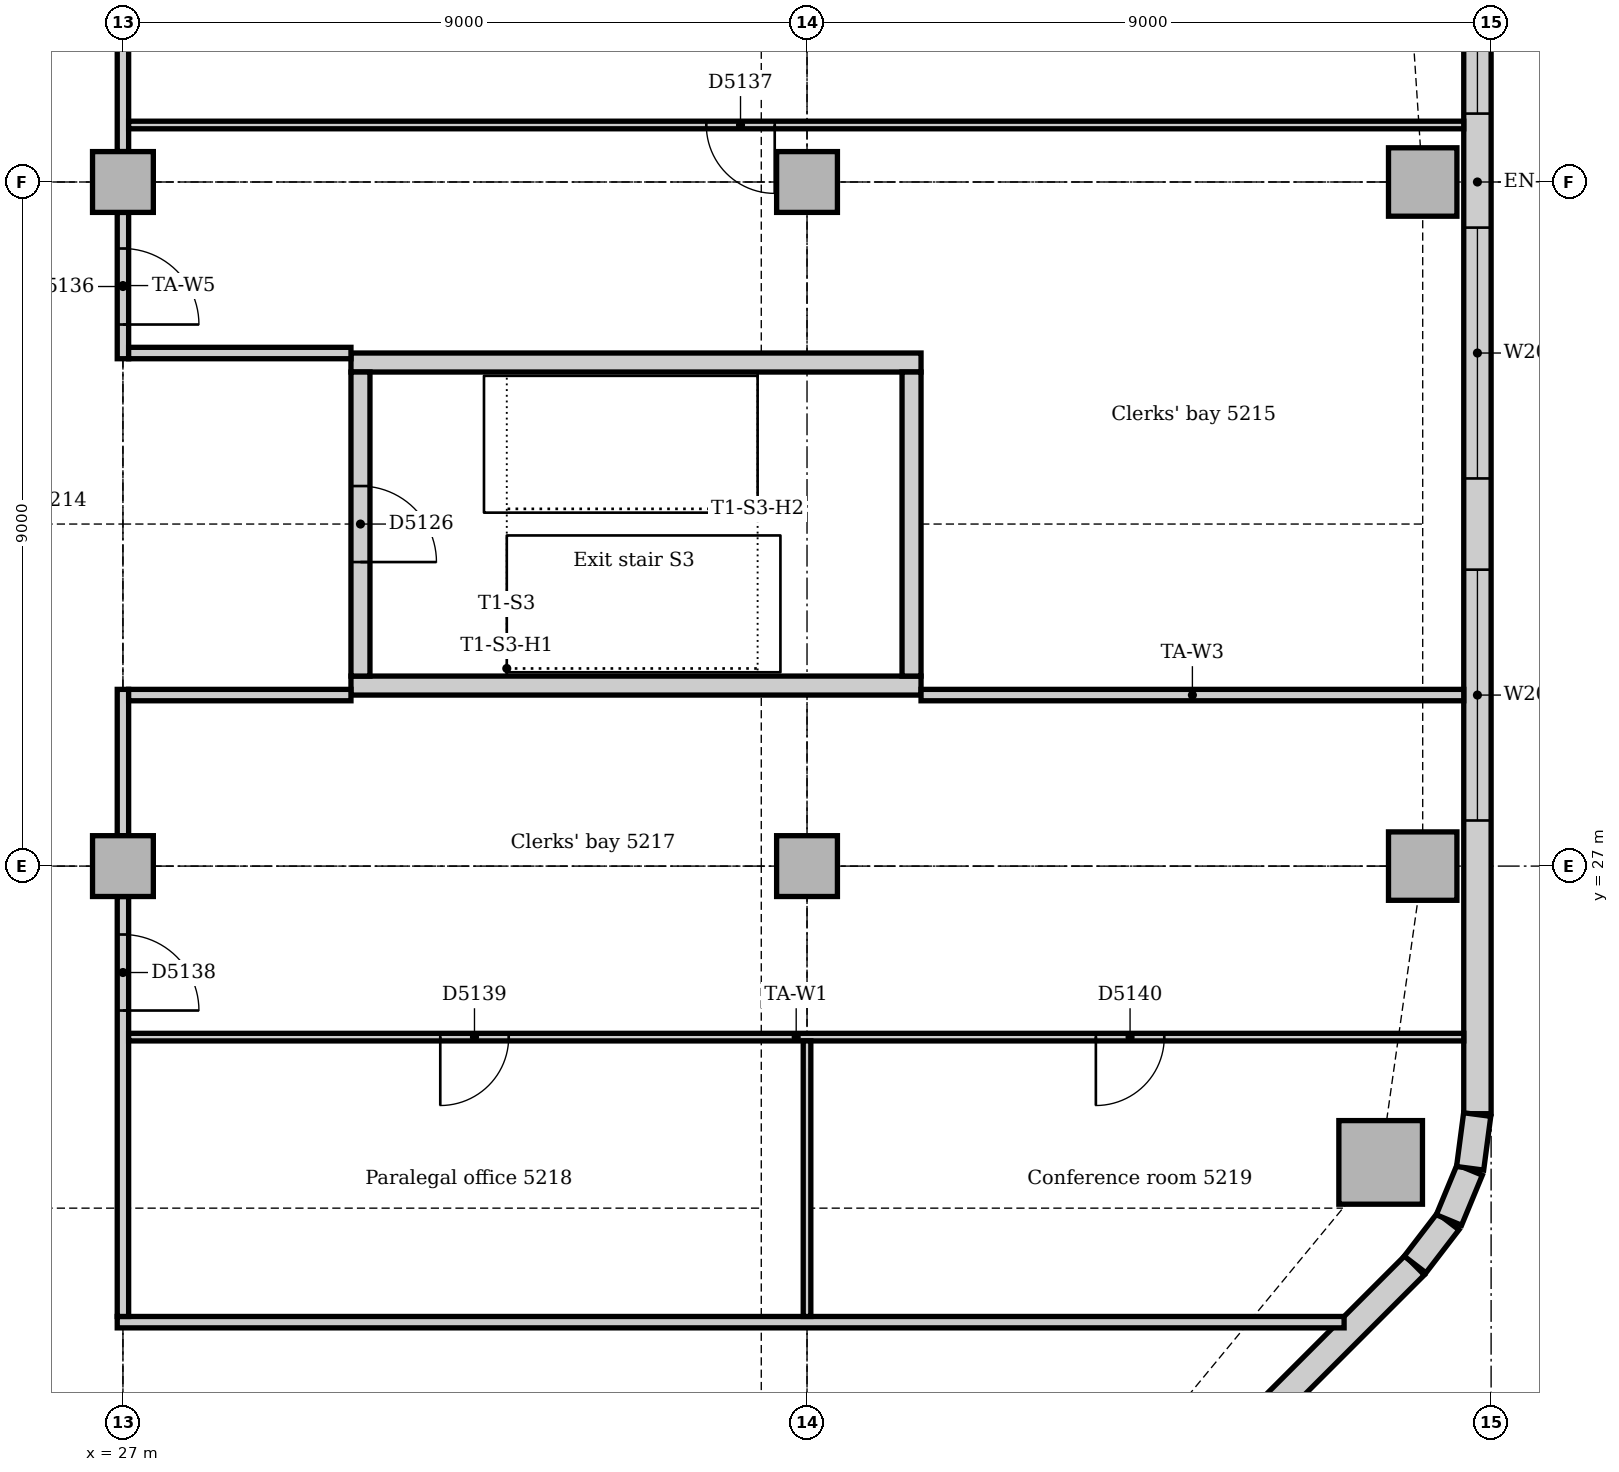
"""IFC4 building model, lengths in metres.
Left out: names, types, materials, properties, quantities, classifications, styles, units other than length and angle.
Written with IfcOpenShell. Run it as: python <this file> out.ifc"""

import sys

from ifc_helpers import new_model, si_unit, direction, frame, frame_2d, origin, origin_2d, place, context, subcontext, project, spatial, rectangle, extrude, element, fill, save


model = new_model("IFC4")
c1 = context("Model", 3, precision=1e-05, world=origin(), true_north=direction((0.0, 1.0)))
c2 = subcontext(c1, "Body", "Model", "MODEL_VIEW")
j1 = project(units=[si_unit("LENGTHUNIT", "METRE"), si_unit("PLANEANGLEUNIT", "RADIAN")], contexts=[c1])
p1 = place(None, origin())
s1 = spatial("IfcSite", under=j1, at=p1, CompositionType="ELEMENT")
p2 = place(p1, origin())
s2 = spatial("IfcBuilding", under=s1, at=p2, CompositionType="ELEMENT")
p3 = place(p2, frame((0.0, 0.0, 218.0)))
s3 = spatial("IfcBuildingStorey", under=s2, at=p3, CompositionType="ELEMENT", Elevation=218.0)
for number, where, z_axis, x_axis in (
    (1, (30.0, 29.375, 0.0), (0.0, 0.0, 1.0), (1.0, 0.0, 0.0)),
    (2, (37.5, 33.625, 0.0), (0.0, 0.0, 1.0), (-1.0, 0.0, 0.0)),
):
    element("IfcWall", number, at=place(p3, frame(where, z_axis=z_axis, x_axis=x_axis)), inside=s3, PredefinedType="SOLIDWALL", context=c2, shape_type="SweptSolid", body=[
        extrude(rectangle(XDim=7.5, YDim=0.25, at=frame_2d((3.75, 0.0))), origin(), (0.0, 0.0, 1.0), 4.0),
    ])
p4 = place(p3, frame((37.375, 29.5, 0.0), z_axis=(0.0, 0.0, 1.0), x_axis=(0.0, 1.0, 0.0)))
e3 = element("IfcWall", 3, at=p4, inside=s3, PredefinedType="SOLIDWALL", context=c2, shape_type="SweptSolid", body=[
    extrude(rectangle(XDim=4.0, YDim=0.25, at=frame_2d((2.0, 0.0))), origin(), (0.0, 0.0, 1.0), 4.0),
])
p5 = place(p3, frame((30.125, 33.5, 0.0), z_axis=(0.0, 0.0, 1.0), x_axis=(0.0, -1.0, 0.0)))
e4 = element("IfcWall", 4, at=p5, inside=s3, PredefinedType="SOLIDWALL", context=c2, shape_type="SweptSolid", body=[
    extrude(rectangle(XDim=4.0, YDim=0.25, at=frame_2d((2.0, 0.0))), origin(), (0.0, 0.0, 1.0), 4.0),
])
p6 = place(p5, frame((1.5, 0.0, 0.0)))
e5 = element("IfcOpeningElement", 5, at=p6, cuts=e4, PredefinedType="OPENING", context=c2, shape_type="SweptSolid", body=[
    extrude(rectangle(XDim=1.0, YDim=2.1, at=frame_2d((0.5, 1.05))), frame((0.0, 0.135, 0.0), z_axis=(0.0, -1.0, 0.0), x_axis=(1.0, 0.0, 0.0)), (0.0, 0.0, 1.0), 0.27),
])
p7 = place(p3, frame((43.547, 23.102, 0.0), z_axis=(0.0, 0.0, 1.0), x_axis=(1.0, 0.0, 0.0)))
e6 = element("IfcColumn", 6, at=p7, inside=s3, PredefinedType="COLUMN", context=c2, shape_type="SweptSolid", body=[
    extrude(rectangle(XDim=1.1, YDim=1.1, at=origin_2d()), origin(), (0.0, 0.0, 1.0), 3.85),
])
for number, where, z_axis, x_axis in (
    (7, (44.1, 27.0, 0.0), (0.0, 0.0, 1.0), (1.0, 0.0, 0.0)),
    (8, (44.1, 36.0, 0.0), (0.0, 0.0, 1.0), (1.0, 0.0, 0.0)),
):
    element("IfcColumn", number, at=place(p3, frame(where, z_axis=z_axis, x_axis=x_axis)), inside=s3, PredefinedType="COLUMN", context=c2, shape_type="SweptSolid", body=[
        extrude(rectangle(XDim=0.9, YDim=0.9, at=origin_2d()), origin(), (0.0, 0.0, 1.0), 3.85),
    ])
for number, where, z_axis, x_axis in (
    (9, (27.0, 27.0, 0.0), (0.0, 0.0, 1.0), (1.0, 0.0, 0.0)),
    (10, (27.0, 36.0, 0.0), (0.0, 0.0, 1.0), (1.0, 0.0, 0.0)),
    (11, (36.0, 27.0, 0.0), (0.0, 0.0, 1.0), (1.0, 0.0, 0.0)),
    (12, (36.0, 36.0, 0.0), (0.0, 0.0, 1.0), (1.0, 0.0, 0.0)),
):
    element("IfcColumn", number, at=place(p3, frame(where, z_axis=z_axis, x_axis=x_axis)), inside=s3, PredefinedType="COLUMN", context=c2, shape_type="SweptSolid", body=[
        extrude(rectangle(XDim=0.8, YDim=0.8, at=origin_2d()), origin(), (0.0, 0.0, 1.0), 3.85),
    ])
p8 = place(p3, frame((36.751, 14.506, 0.0), z_axis=(0.0, 0.0, 1.0), x_axis=(0.707106781187, 0.707106781187, 0.0)))
e13 = element("IfcWall", 13, at=p8, inside=s3, PredefinedType="STANDARD", context=c2, shape_type="SweptSolid", body=[
    extrude(rectangle(XDim=10.243, YDim=0.36, at=frame_2d((5.121, 0.0))), origin(), (0.0, 0.0, 1.0), 3.85),
])
p9 = place(p8, frame((5.021, 0.0, 0.9)))
e14 = element("IfcOpeningElement", 14, at=p9, cuts=e13, PredefinedType="OPENING", context=c2, shape_type="SweptSolid", body=[
    extrude(rectangle(XDim=1.8, YDim=1.6, at=frame_2d((0.9, 0.8))), frame((0.0, 0.19, 0.0), z_axis=(0.0, -1.0, 0.0), x_axis=(1.0, 0.0, 0.0)), (0.0, 0.0, 1.0), 0.38),
])
p10 = place(p3, frame((44.82, 23.743, 0.0), z_axis=(0.0, 0.0, 1.0), x_axis=(0.0, 1.0, 0.0)))
e15 = element("IfcWall", 15, at=p10, inside=s3, PredefinedType="STANDARD", context=c2, shape_type="SweptSolid", body=[
    extrude(rectangle(XDim=24.515, YDim=0.36, at=frame_2d((12.257, 0.0))), origin(), (0.0, 0.0, 1.0), 3.85),
])
p11 = place(p10, frame((3.857, 0.0, 0.9)))
e16 = element("IfcOpeningElement", 16, at=p11, cuts=e15, PredefinedType="OPENING", context=c2, shape_type="SweptSolid", body=[
    extrude(rectangle(XDim=3.3, YDim=1.6, at=frame_2d((1.65, 0.8))), frame((0.0, 0.19, 0.0), z_axis=(0.0, -1.0, 0.0), x_axis=(1.0, 0.0, 0.0)), (0.0, 0.0, 1.0), 0.38),
])
p12 = place(p10, frame((8.357, 0.0, 0.9)))
e17 = element("IfcOpeningElement", 17, at=p12, cuts=e15, PredefinedType="OPENING", context=c2, shape_type="SweptSolid", body=[
    extrude(rectangle(XDim=3.3, YDim=1.6, at=frame_2d((1.65, 0.8))), frame((0.0, 0.19, 0.0), z_axis=(0.0, -1.0, 0.0), x_axis=(1.0, 0.0, 0.0)), (0.0, 0.0, 1.0), 0.38),
])
p13 = place(p10, frame((13.157, 0.0, 0.9)))
e18 = element("IfcOpeningElement", 18, at=p13, cuts=e15, PredefinedType="OPENING", context=c2, shape_type="SweptSolid", body=[
    extrude(rectangle(XDim=3.3, YDim=1.6, at=frame_2d((1.65, 0.8))), frame((0.0, 0.19, 0.0), z_axis=(0.0, -1.0, 0.0), x_axis=(1.0, 0.0, 0.0)), (0.0, 0.0, 1.0), 0.38),
])
p14 = place(p10, frame((17.357, 0.0, 0.9)))
e19 = element("IfcOpeningElement", 19, at=p14, cuts=e15, PredefinedType="OPENING", context=c2, shape_type="SweptSolid", body=[
    extrude(rectangle(XDim=3.3, YDim=1.6, at=frame_2d((1.65, 0.8))), frame((0.0, 0.19, 0.0), z_axis=(0.0, -1.0, 0.0), x_axis=(1.0, 0.0, 0.0)), (0.0, 0.0, 1.0), 0.38),
])
p15 = place(p3, frame((44.0, 21.759, 0.0), z_axis=(0.0, 0.0, 1.0), x_axis=(0.608802368033, 0.793321924995, 0.0)))
e20 = element("IfcWall", 20, at=p15, inside=s3, PredefinedType="STANDARD", context=c2, shape_type="SweptSolid", body=[
    extrude(rectangle(XDim=0.713, YDim=0.36, at=frame_2d((0.357, 0.0))), origin(), (0.0, 0.0, 1.0), 3.85),
])
for number, where, z_axis, x_axis in (
    (21, (44.445, 22.344, 0.0), (0.0, 0.0, 1.0), (0.383, 0.924, 0.0)),
    (22, (44.724, 23.024, 0.0), (0.0, 0.0, 1.0), (0.131, 0.991, 0.0)),
):
    element("IfcWall", number, at=place(p3, frame(where, z_axis=z_axis, x_axis=x_axis)), inside=s3, PredefinedType="STANDARD", context=c2, shape_type="SweptSolid", body=[
        extrude(rectangle(XDim=0.713, YDim=0.36, at=frame_2d((0.356, 0.0))), origin(), (0.0, 0.0, 1.0), 3.85),
    ])
p16 = place(p3, frame((26.925, 21.0, 0.0), z_axis=(0.0, 0.0, 1.0), x_axis=(1.0, 0.0, 0.0)))
e23 = element("IfcWall", 23, at=p16, inside=s3, PredefinedType="PARTITIONING", context=c2, shape_type="SweptSolid", body=[
    extrude(rectangle(XDim=16.141, YDim=0.15, at=frame_2d((8.07, 0.0))), origin(), (0.0, 0.0, 1.0), 3.85),
])
p17 = place(p3, frame((27.0, 33.675, 0.0), z_axis=(0.0, 0.0, 1.0), x_axis=(0.0, 1.0, 0.0)))
e24 = element("IfcWall", 24, at=p17, inside=s3, PredefinedType="PARTITIONING", context=c2, shape_type="SweptSolid", body=[
    extrude(rectangle(XDim=1.925, YDim=0.15, at=frame_2d((0.963, 0.0))), origin(), (0.0, 0.0, 1.0), 3.35),
])
p18 = place(p17, frame((0.45, 0.0, 0.0)))
e25 = element("IfcOpeningElement", 25, at=p18, cuts=e24, PredefinedType="OPENING", context=c2, shape_type="SweptSolid", body=[
    extrude(rectangle(XDim=1.0, YDim=2.1, at=frame_2d((0.5, 1.05))), frame((0.0, 0.085, 0.0), z_axis=(0.0, -1.0, 0.0), x_axis=(1.0, 0.0, 0.0)), (0.0, 0.0, 1.0), 0.17),
])
p19 = place(p3, frame((27.0, 36.4, 0.0), z_axis=(0.0, 0.0, 1.0), x_axis=(0.0, 1.0, 0.0)))
e26 = element("IfcWall", 26, at=p19, inside=s3, PredefinedType="PARTITIONING", context=c2, shape_type="SweptSolid", body=[
    extrude(rectangle(XDim=7.3, YDim=0.15, at=frame_2d((3.65, 0.0))), origin(), (0.0, 0.0, 1.0), 3.35),
])
p20 = place(p3, frame((27.0, 21.075, 0.0), z_axis=(0.0, 0.0, 1.0), x_axis=(0.0, 1.0, 0.0)))
e27 = element("IfcWall", 27, at=p20, inside=s3, PredefinedType="PARTITIONING", context=c2, shape_type="SweptSolid", body=[
    extrude(rectangle(XDim=5.525, YDim=0.15, at=frame_2d((2.763, 0.0))), origin(), (0.0, 0.0, 1.0), 3.35),
])
p21 = place(p20, frame((4.025, 0.0, 0.0)))
e28 = element("IfcOpeningElement", 28, at=p21, cuts=e27, PredefinedType="OPENING", context=c2, shape_type="SweptSolid", body=[
    extrude(rectangle(XDim=1.0, YDim=2.1, at=frame_2d((0.5, 1.05))), frame((0.0, 0.085, 0.0), z_axis=(0.0, -1.0, 0.0), x_axis=(1.0, 0.0, 0.0)), (0.0, 0.0, 1.0), 0.17),
])
p22 = place(p3, frame((27.0, 27.4, 0.0), z_axis=(0.0, 0.0, 1.0), x_axis=(0.0, 1.0, 0.0)))
e29 = element("IfcWall", 29, at=p22, inside=s3, PredefinedType="PARTITIONING", context=c2, shape_type="SweptSolid", body=[
    extrude(rectangle(XDim=1.925, YDim=0.15, at=frame_2d((0.963, 0.0))), origin(), (0.0, 0.0, 1.0), 3.35),
])
for number, where, z_axis, x_axis in (
    (30, (27.075, 29.25, 0.0), (0.0, 0.0, 1.0), (1.0, 0.0, 0.0)),
    (31, (27.075, 33.75, 0.0), (0.0, 0.0, 1.0), (1.0, 0.0, 0.0)),
):
    element("IfcWall", number, at=place(p3, frame(where, z_axis=z_axis, x_axis=x_axis)), inside=s3, PredefinedType="PARTITIONING", context=c2, shape_type="SweptSolid", body=[
        extrude(rectangle(XDim=2.925, YDim=0.15, at=frame_2d((1.462, 0.0))), origin(), (0.0, 0.0, 1.0), 3.85),
    ])
p23 = place(p3, frame((37.5, 29.25, 0.0), z_axis=(0.0, 0.0, 1.0), x_axis=(1.0, 0.0, 0.0)))
e32 = element("IfcWall", 32, at=p23, inside=s3, PredefinedType="PARTITIONING", context=c2, shape_type="SweptSolid", body=[
    extrude(rectangle(XDim=7.14, YDim=0.15, at=frame_2d((3.57, 0.0))), origin(), (0.0, 0.0, 1.0), 3.85),
])
p24 = place(p3, frame((27.075, 24.75, 0.0), z_axis=(0.0, 0.0, 1.0), x_axis=(1.0, 0.0, 0.0)))
e33 = element("IfcWall", 33, at=p24, inside=s3, PredefinedType="PARTITIONING", context=c2, shape_type="SweptSolid", body=[
    extrude(rectangle(XDim=17.565, YDim=0.1, at=frame_2d((8.783, 0.0))), origin(), (0.0, 0.0, 1.0), 3.85),
])
p25 = place(p24, frame((4.1, 0.0, 0.0)))
e34 = element("IfcOpeningElement", 34, at=p25, cuts=e33, PredefinedType="OPENING", context=c2, shape_type="SweptSolid", body=[
    extrude(rectangle(XDim=0.9, YDim=2.1, at=frame_2d((0.45, 1.05))), frame((0.0, 0.06, 0.0), z_axis=(0.0, -1.0, 0.0), x_axis=(1.0, 0.0, 0.0)), (0.0, 0.0, 1.0), 0.12),
])
p26 = place(p24, frame((12.725, 0.0, 0.0)))
e35 = element("IfcOpeningElement", 35, at=p26, cuts=e33, PredefinedType="OPENING", context=c2, shape_type="SweptSolid", body=[
    extrude(rectangle(XDim=0.9, YDim=2.1, at=frame_2d((0.45, 1.05))), frame((0.0, 0.06, 0.0), z_axis=(0.0, -1.0, 0.0), x_axis=(1.0, 0.0, 0.0)), (0.0, 0.0, 1.0), 0.12),
])
p27 = place(p3, frame((27.075, 36.75, 0.0), z_axis=(0.0, 0.0, 1.0), x_axis=(1.0, 0.0, 0.0)))
e36 = element("IfcWall", 36, at=p27, inside=s3, PredefinedType="PARTITIONING", context=c2, shape_type="SweptSolid", body=[
    extrude(rectangle(XDim=17.565, YDim=0.1, at=frame_2d((8.783, 0.0))), origin(), (0.0, 0.0, 1.0), 3.85),
])
p28 = place(p27, frame((7.6, 0.0, 0.0)))
e37 = element("IfcOpeningElement", 37, at=p28, cuts=e36, PredefinedType="OPENING", context=c2, shape_type="SweptSolid", body=[
    extrude(rectangle(XDim=0.9, YDim=2.1, at=frame_2d((0.45, 1.05))), frame((0.0, 0.06, 0.0), z_axis=(0.0, -1.0, 0.0), x_axis=(1.0, 0.0, 0.0)), (0.0, 0.0, 1.0), 0.12),
])
p29 = place(p3, frame((36.0, 21.075, 0.0), z_axis=(0.0, 0.0, 1.0), x_axis=(0.0, 1.0, 0.0)))
e38 = element("IfcWall", 38, at=p29, inside=s3, PredefinedType="PARTITIONING", context=c2, shape_type="SweptSolid", body=[
    extrude(rectangle(XDim=3.625, YDim=0.1, at=frame_2d((1.812, 0.0))), origin(), (0.0, 0.0, 1.0), 3.35),
])
p30 = place(p11, origin())
e39 = element("IfcWindow", 39, at=p30, inside=s3, PartitioningType="SINGLE_PANEL", PredefinedType="WINDOW", context=c2, shape_type="SweptSolid", body=[
    extrude(rectangle(XDim=3.3, YDim=1.6, at=frame_2d((1.65, 0.8))), frame((0.0, 0.13, 0.0), z_axis=(0.0, -1.0, 0.0), x_axis=(1.0, 0.0, 0.0)), (0.0, 0.0, 1.0), 0.06),
])
fill(e16, e39)
p31 = place(p12, origin())
e40 = element("IfcWindow", 40, at=p31, inside=s3, PartitioningType="SINGLE_PANEL", PredefinedType="WINDOW", context=c2, shape_type="SweptSolid", body=[
    extrude(rectangle(XDim=3.3, YDim=1.6, at=frame_2d((1.65, 0.8))), frame((0.0, 0.13, 0.0), z_axis=(0.0, -1.0, 0.0), x_axis=(1.0, 0.0, 0.0)), (0.0, 0.0, 1.0), 0.06),
])
fill(e17, e40)
p32 = place(p13, origin())
e41 = element("IfcWindow", 41, at=p32, inside=s3, PartitioningType="SINGLE_PANEL", PredefinedType="WINDOW", context=c2, shape_type="SweptSolid", body=[
    extrude(rectangle(XDim=3.3, YDim=1.6, at=frame_2d((1.65, 0.8))), frame((0.0, 0.13, 0.0), z_axis=(0.0, -1.0, 0.0), x_axis=(1.0, 0.0, 0.0)), (0.0, 0.0, 1.0), 0.06),
])
fill(e18, e41)
p33 = place(p6, origin())
e42 = element("IfcDoor", 42, at=p33, inside=s3, OperationType="SINGLE_SWING_RIGHT", PredefinedType="DOOR", context=c2, shape_type="SweptSolid", body=[
    extrude(rectangle(XDim=1.0, YDim=2.1, at=frame_2d((0.5, 1.05))), frame((0.0, 0.025, 0.0), z_axis=(0.0, -1.0, 0.0), x_axis=(1.0, 0.0, 0.0)), (0.0, 0.0, 1.0), 0.05),
])
fill(e5, e42)
p34 = place(p18, frame((1.0, 0.0, 0.0), z_axis=(0.0, 0.0, 1.0), x_axis=(-1.0, 0.0, 0.0)))
e43 = element("IfcDoor", 43, at=p34, inside=s3, OperationType="SINGLE_SWING_RIGHT", PredefinedType="DOOR", context=c2, shape_type="SweptSolid", body=[
    extrude(rectangle(XDim=1.0, YDim=2.1, at=frame_2d((0.5, 1.05))), frame((0.0, 0.025, 0.0), z_axis=(0.0, -1.0, 0.0), x_axis=(1.0, 0.0, 0.0)), (0.0, 0.0, 1.0), 0.05),
])
fill(e25, e43)
p35 = place(p28, frame((0.9, 0.0, 0.0), z_axis=(0.0, 0.0, 1.0), x_axis=(-1.0, 0.0, 0.0)))
e44 = element("IfcDoor", 44, at=p35, inside=s3, OperationType="SINGLE_SWING_LEFT", PredefinedType="DOOR", context=c2, shape_type="SweptSolid", body=[
    extrude(rectangle(XDim=0.9, YDim=2.1, at=frame_2d((0.45, 1.05))), frame((0.0, 0.025, 0.0), z_axis=(0.0, -1.0, 0.0), x_axis=(1.0, 0.0, 0.0)), (0.0, 0.0, 1.0), 0.05),
])
fill(e37, e44)
p36 = place(p21, frame((1.0, 0.0, 0.0), z_axis=(0.0, 0.0, 1.0), x_axis=(-1.0, 0.0, 0.0)))
e45 = element("IfcDoor", 45, at=p36, inside=s3, OperationType="SINGLE_SWING_RIGHT", PredefinedType="DOOR", context=c2, shape_type="SweptSolid", body=[
    extrude(rectangle(XDim=1.0, YDim=2.1, at=frame_2d((0.5, 1.05))), frame((0.0, 0.025, 0.0), z_axis=(0.0, -1.0, 0.0), x_axis=(1.0, 0.0, 0.0)), (0.0, 0.0, 1.0), 0.05),
])
fill(e28, e45)
p37 = place(p25, frame((0.9, 0.0, 0.0), z_axis=(0.0, 0.0, 1.0), x_axis=(-1.0, 0.0, 0.0)))
e46 = element("IfcDoor", 46, at=p37, inside=s3, OperationType="SINGLE_SWING_RIGHT", PredefinedType="DOOR", context=c2, shape_type="SweptSolid", body=[
    extrude(rectangle(XDim=0.9, YDim=2.1, at=frame_2d((0.45, 1.05))), frame((0.0, 0.025, 0.0), z_axis=(0.0, -1.0, 0.0), x_axis=(1.0, 0.0, 0.0)), (0.0, 0.0, 1.0), 0.05),
])
fill(e34, e46)
p38 = place(p26, frame((0.9, 0.0, 0.0), z_axis=(0.0, 0.0, 1.0), x_axis=(-1.0, 0.0, 0.0)))
e47 = element("IfcDoor", 47, at=p38, inside=s3, OperationType="SINGLE_SWING_RIGHT", PredefinedType="DOOR", context=c2, shape_type="SweptSolid", body=[
    extrude(rectangle(XDim=0.9, YDim=2.1, at=frame_2d((0.45, 1.05))), frame((0.0, 0.025, 0.0), z_axis=(0.0, -1.0, 0.0), x_axis=(1.0, 0.0, 0.0)), (0.0, 0.0, 1.0), 0.05),
])
fill(e35, e47)
save(model, sys.argv[1])
